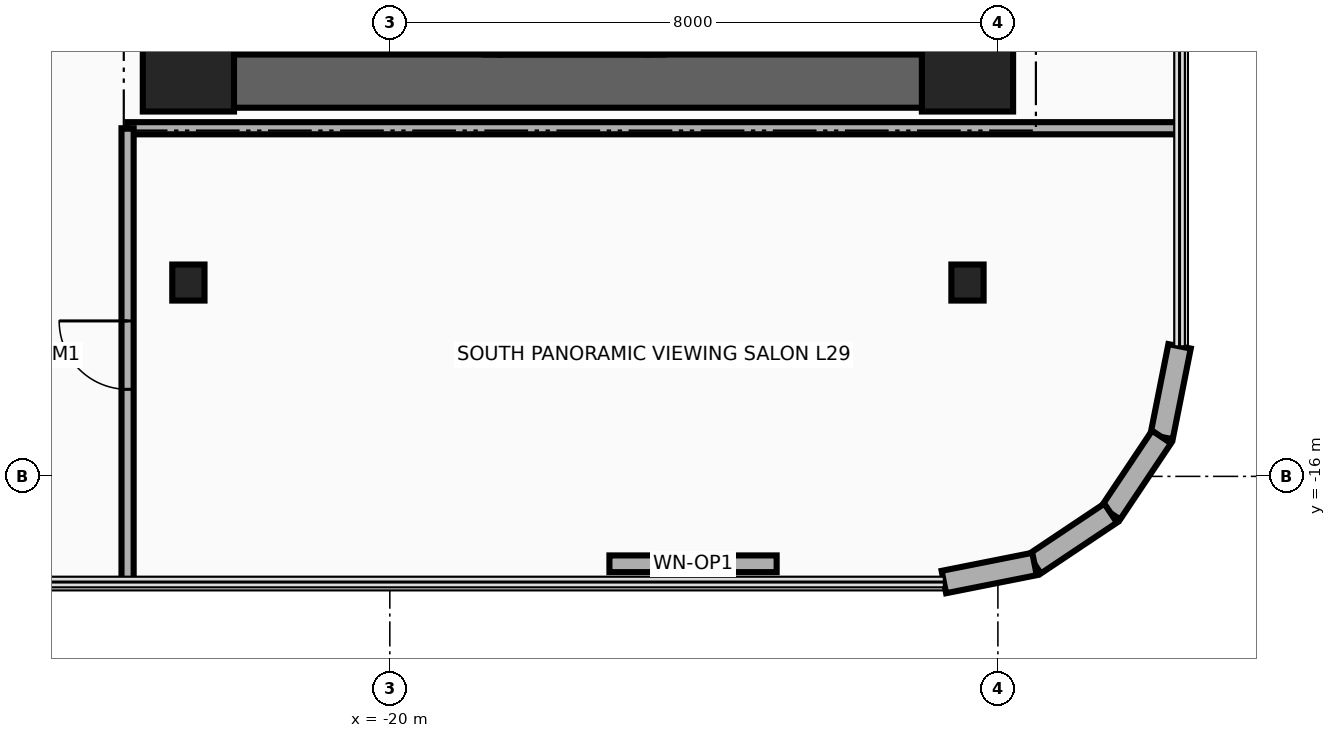
"""IFC4 building model, lengths in metres.
Left out: names, types, materials, properties, quantities, classifications, styles, units other than length and angle.
Written with IfcOpenShell. Run it as: python <this file> out.ifc"""

import sys

from ifc_helpers import new_model, si_unit, direction, frame, frame_2d, origin, origin_2d, place, context, subcontext, project, spatial, rectangle, i_section, extrude, source, transform, mapped, element, fill, save


model = new_model("IFC4")
c1 = context("Model", 3, precision=1e-05, world=origin(), true_north=direction((0.0, 1.0)))
c2 = subcontext(c1, "Body", "Model", "MODEL_VIEW")
j1 = project(units=[si_unit("LENGTHUNIT", "METRE"), si_unit("PLANEANGLEUNIT", "RADIAN")], contexts=[c1])
p1 = place(None, origin())
s1 = spatial("IfcSite", under=j1, at=p1, CompositionType="ELEMENT")
p2 = place(p1, origin())
s2 = spatial("IfcBuilding", under=s1, at=p2, CompositionType="ELEMENT")
p3 = place(p2, frame((0.0, 0.0, 116.8)))
s3 = spatial("IfcBuildingStorey", under=s2, at=p3, CompositionType="ELEMENT", Elevation=116.8)
for number, where, z_axis, x_axis in (
    (1, (-22.16, -10.45, 0.0), (0.0, 0.0, 1.0), (0.0, 1.0, 0.0)),
    (2, (-18.83, -10.45, 0.0), (0.0, 0.0, 1.0), (0.0, 1.0, 0.0)),
):
    element("IfcWall", number, at=place(p3, frame(where, z_axis=z_axis, x_axis=x_axis)), inside=s3, PredefinedType="SHEAR", context=c2, shape_type="SweptSolid", body=[
        extrude(rectangle(XDim=8.67, YDim=0.22, at=frame_2d((4.335, 0.0))), origin(), (0.0, 0.0, 1.0), 3.46),
    ])
p4 = place(p3, frame((-22.65, -11.15, 0.0), z_axis=(0.0, 0.0, 1.0), x_axis=(0.0, 1.0, 0.0)))
e3 = element("IfcWall", 3, at=p4, inside=s3, PredefinedType="SHEAR", context=c2, shape_type="SweptSolid", body=[
    extrude(rectangle(XDim=22.3, YDim=0.7, at=frame_2d((11.15, 0.0))), origin(), (0.0, 0.0, 1.0), 3.46),
])
p5 = place(p3, frame((-22.65, -10.8, 0.0), z_axis=(0.0, 0.0, 1.0), x_axis=(1.0, 0.0, 0.0)))
e4 = element("IfcWall", 4, at=p5, inside=s3, PredefinedType="SHEAR", context=c2, shape_type="SweptSolid", body=[
    extrude(rectangle(XDim=10.25, YDim=0.7, at=frame_2d((5.125, 0.0))), origin(), (0.0, 0.0, 1.0), 3.46),
])
m1 = source(origin(), c2, "Body", "SweptSolid", [
    extrude(rectangle(XDim=1.2, YDim=1.2, at=origin_2d()), origin(), (0.0, 0.0, 1.0), 3.7),
])
for number, where, z_axis, x_axis in (
    (5, (-22.65, -10.6, 0.0), (0.0, 0.0, 1.0), (1.0, 0.0, 0.0)),
    (6, (-12.4, -10.6, 0.0), (0.0, 0.0, 1.0), (1.0, 0.0, 0.0)),
):
    element("IfcColumn", number, at=place(p3, frame(where, z_axis=z_axis, x_axis=x_axis)), inside=s3, PredefinedType="COLUMN", context=c2, shape_type="MappedRepresentation", body=[
        mapped(m1, transform((0.0, 0.0, 0.0), x_axis=(1.0, 0.0, 0.0), y_axis=(0.0, 1.0, 0.0), z_axis=(0.0, 0.0, 1.0), scale=1.0)),
    ])
m2 = source(origin(), c2, "Body", "SweptSolid", [
    extrude(i_section(OverallWidth=0.424, OverallDepth=0.474, WebThickness=0.048, FlangeThickness=0.077, at=origin_2d()), origin(), (0.0, 0.0, 1.0), 3.7),
])
for number, where, z_axis, x_axis in (
    (7, (-22.65, -13.45, 0.0), (0.0, 0.0, 1.0), (1.0, 0.0, 0.0)),
    (8, (-12.4, -13.45, 0.0), (0.0, 0.0, 1.0), (1.0, 0.0, 0.0)),
):
    element("IfcColumn", number, at=place(p3, frame(where, z_axis=z_axis, x_axis=x_axis)), inside=s3, PredefinedType="COLUMN", context=c2, shape_type="MappedRepresentation", body=[
        mapped(m2, transform((0.0, 0.0, 0.0), x_axis=(1.0, 0.0, 0.0), y_axis=(0.0, 1.0, 0.0), z_axis=(0.0, 0.0, 1.0), scale=1.0)),
    ])
p6 = place(p3, frame((-9.61, -14.289, 0.0), z_axis=(0.0, 0.0, 1.0), x_axis=(-0.194996050505, -0.980804027463, 0.0)))
e9 = element("IfcWall", 9, at=p6, inside=s3, PredefinedType="SOLIDWALL", context=c2, shape_type="SweptSolid", body=[
    extrude(rectangle(XDim=1.216, YDim=0.3, at=frame_2d((0.608, 0.0))), origin(), (0.0, 0.0, 1.0), 3.46),
])
for number, where, z_axis, x_axis in (
    (10, (-9.847, -15.482, 0.0), (0.0, 0.0, 1.0), (-0.556, -0.831, 0.0)),
    (11, (-10.517, -16.483, 0.0), (0.0, 0.0, 1.0), (-0.831, -0.556, 0.0)),
):
    element("IfcWall", number, at=place(p3, frame(where, z_axis=z_axis, x_axis=x_axis)), inside=s3, PredefinedType="SOLIDWALL", context=c2, shape_type="SweptSolid", body=[
        extrude(rectangle(XDim=1.205, YDim=0.3, at=frame_2d((0.603, 0.0))), origin(), (0.0, 0.0, 1.0), 3.46),
    ])
p7 = place(p3, frame((-11.518, -17.153, 0.0), z_axis=(0.0, 0.0, 1.0), x_axis=(-0.980804027463, -0.194996050505, 0.0)))
e12 = element("IfcWall", 12, at=p7, inside=s3, PredefinedType="SOLIDWALL", context=c2, shape_type="SweptSolid", body=[
    extrude(rectangle(XDim=1.216, YDim=0.3, at=frame_2d((0.608, 0.0))), origin(), (0.0, 0.0, 1.0), 3.46),
])
p8 = place(p3, frame((-14.911, -17.15, 0.0), z_axis=(0.0, 0.0, 1.0), x_axis=(-1.0, 0.0, 0.0)))
e13 = element("IfcWall", 13, at=p8, inside=s3, PredefinedType="SOLIDWALL", context=c2, shape_type="SweptSolid", body=[
    extrude(rectangle(XDim=2.2, YDim=0.22, at=frame_2d((1.1, 0.0))), origin(), (0.0, 0.0, 1.0), 3.46),
])
p9 = place(p8, frame((0.65, 0.0, 0.95)))
e14 = element("IfcOpeningElement", 14, at=p9, cuts=e13, PredefinedType="OPENING", context=c2, shape_type="SweptSolid", body=[
    extrude(rectangle(XDim=0.9, YDim=1.3, at=frame_2d((0.45, 0.65))), frame((0.0, 0.125, 0.0), z_axis=(0.0, -1.0, 0.0), x_axis=(1.0, 0.0, 0.0)), (0.0, 0.0, 1.0), 0.25),
])
for number, where, z_axis, x_axis in (
    (15, (-18.65, -10.45, 0.0), (0.0, 0.0, 1.0), (0.0, 1.0, 0.0)),
    (16, (-16.5, -10.45, 0.0), (0.0, 0.0, 1.0), (0.0, 1.0, 0.0)),
):
    element("IfcWall", number, at=place(p3, frame(where, z_axis=z_axis, x_axis=x_axis)), inside=s3, PredefinedType="MOVABLE", context=c2, shape_type="SweptSolid", body=[
        extrude(rectangle(XDim=2.35, YDim=0.2, at=frame_2d((1.175, 0.0))), origin(), (0.0, 0.0, 1.0), 2.666),
    ])
p10 = place(p3, frame((-18.55, -10.35, 0.0), z_axis=(0.0, 0.0, 1.0), x_axis=(1.0, 0.0, 0.0)))
e17 = element("IfcWall", 17, at=p10, inside=s3, PredefinedType="MOVABLE", context=c2, shape_type="SweptSolid", body=[
    extrude(rectangle(XDim=1.95, YDim=0.2, at=frame_2d((0.975, 0.0))), origin(), (0.0, 0.0, 1.0), 2.666),
])
p11 = place(p3, frame((-23.45, -11.42, 0.0), z_axis=(0.0, 0.0, 1.0), x_axis=(1.0, 0.0, 0.0)))
e18 = element("IfcWall", 18, at=p11, inside=s3, PredefinedType="PARTITIONING", context=c2, shape_type="SweptSolid", body=[
    extrude(rectangle(XDim=13.84, YDim=0.16, at=frame_2d((6.92, 0.0))), origin(), (0.0, 0.0, 1.0), 2.834),
])
p12 = place(p3, frame((-23.45, -17.39, 0.0), z_axis=(0.0, 0.0, 1.0), x_axis=(0.0, 1.0, 0.0)))
e19 = element("IfcWall", 19, at=p12, inside=s3, PredefinedType="PARTITIONING", context=c2, shape_type="SweptSolid", body=[
    extrude(rectangle(XDim=5.97, YDim=0.16, at=frame_2d((2.985, 0.0))), origin(), (0.0, 0.0, 1.0), 3.46),
])
p13 = place(p12, frame((2.535, 0.0, 0.0)))
e20 = element("IfcOpeningElement", 20, at=p13, cuts=e19, PredefinedType="OPENING", context=c2, shape_type="SweptSolid", body=[
    extrude(rectangle(XDim=0.9, YDim=2.1, at=frame_2d((0.45, 1.05))), frame((0.0, 0.095, 0.0), z_axis=(0.0, -1.0, 0.0), x_axis=(1.0, 0.0, 0.0)), (0.0, 0.0, 1.0), 0.19),
])
p14 = place(p9, origin())
e21 = element("IfcWindow", 21, at=p14, inside=s3, PartitioningType="SINGLE_PANEL", PredefinedType="WINDOW", context=c2, shape_type="SweptSolid", body=[
    extrude(rectangle(XDim=0.9, YDim=1.3, at=frame_2d((0.45, 0.65))), frame((0.0, 0.03, 0.0), z_axis=(0.0, -1.0, 0.0), x_axis=(1.0, 0.0, 0.0)), (0.0, 0.0, 1.0), 0.06),
])
fill(e14, e21)
p15 = place(p13, origin())
e22 = element("IfcDoor", 22, at=p15, inside=s3, OperationType="SINGLE_SWING_RIGHT", PredefinedType="DOOR", context=c2, shape_type="SweptSolid", body=[
    extrude(rectangle(XDim=0.9, YDim=2.1, at=frame_2d((0.45, 1.05))), frame((0.0, 0.025, 0.0), z_axis=(0.0, -1.0, 0.0), x_axis=(1.0, 0.0, 0.0)), (0.0, 0.0, 1.0), 0.05),
])
fill(e20, e22)
save(model, sys.argv[1])
